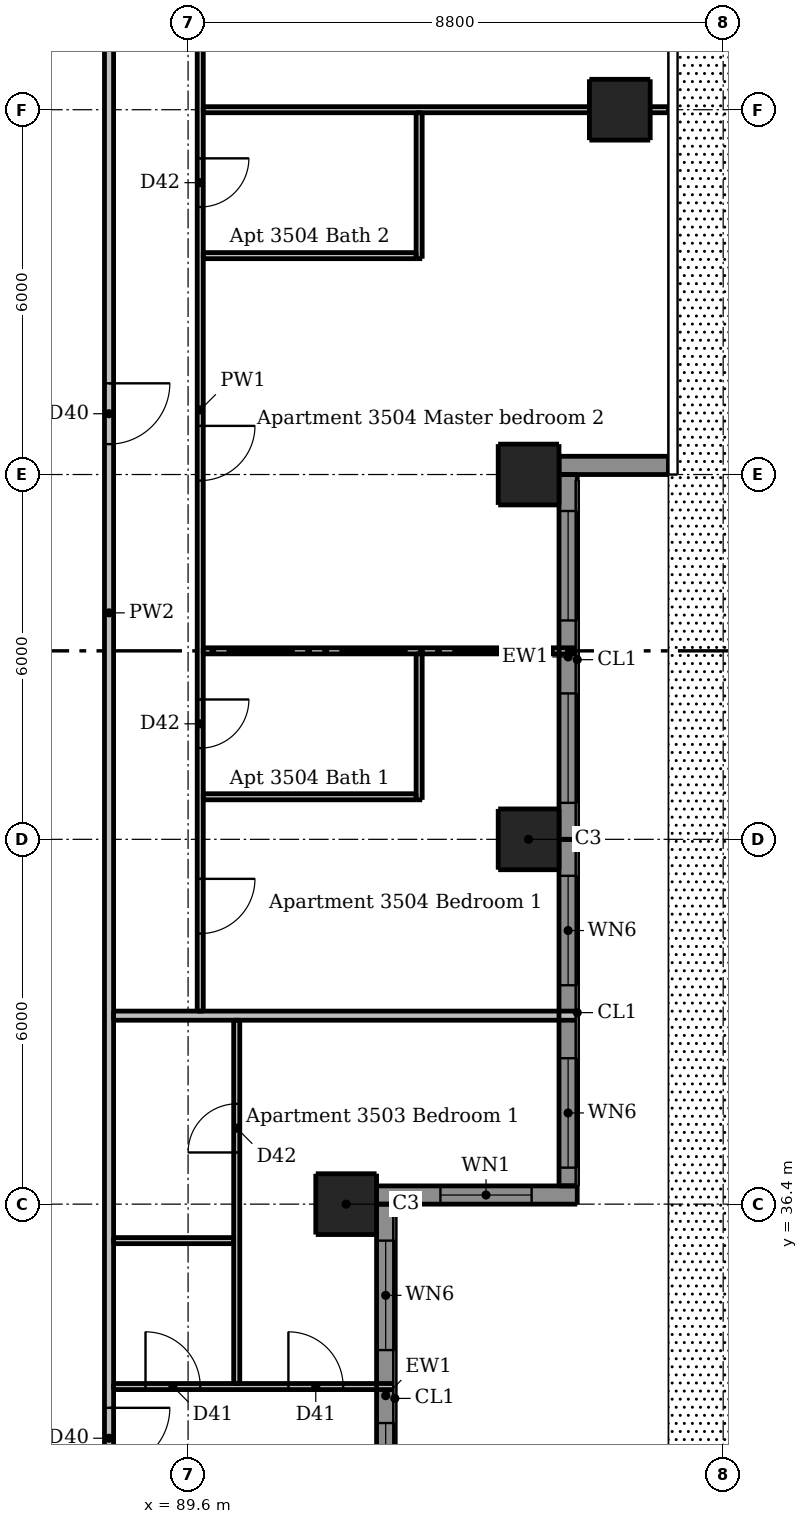
"""IFC4 building model, lengths in metres.
Left out: names, types, materials, properties, quantities, classifications, styles, units other than length and angle.
Written with IfcOpenShell. Run it as: python <this file> out.ifc"""

import sys

from ifc_helpers import new_model, si_unit, direction, frame, frame_2d, origin, origin_2d, place, context, subcontext, project, spatial, rectangle, extrude, element, fill, save


model = new_model("IFC4")
c1 = context("Model", 3, precision=1e-05, world=origin(), true_north=direction((0.0, 1.0)))
c2 = subcontext(c1, "Body", "Model", "MODEL_VIEW")
j1 = project(units=[si_unit("LENGTHUNIT", "METRE"), si_unit("PLANEANGLEUNIT", "RADIAN")], contexts=[c1])
p1 = place(None, origin())
s1 = spatial("IfcSite", under=j1, at=p1, CompositionType="ELEMENT")
p2 = place(p1, origin())
s2 = spatial("IfcBuilding", under=s1, at=p2, CompositionType="ELEMENT")
p3 = place(p2, frame((0.0, 0.0, 133.9)))
s3 = spatial("IfcBuildingStorey", under=s2, at=p3, CompositionType="ELEMENT", Elevation=133.9)
for number, where, z_axis, x_axis in (
    (1, (92.2, 36.4, 0.0), (0.0, 0.0, 1.0), (1.0, 0.0, 0.0)),
    (2, (95.2, 42.4, 0.0), (0.0, 0.0, 1.0), (1.0, 0.0, 0.0)),
    (3, (95.2, 48.4, 0.0), (0.0, 0.0, 1.0), (1.0, 0.0, 0.0)),
    (4, (96.7, 54.4, 0.0), (0.0, 0.0, 1.0), (1.0, 0.0, 0.0)),
):
    element("IfcColumn", number, at=place(p3, frame(where, z_axis=z_axis, x_axis=x_axis)), inside=s3, PredefinedType="COLUMN", context=c2, shape_type="SweptSolid", body=[
        extrude(rectangle(XDim=1.0, YDim=1.0, at=origin_2d()), origin(), (0.0, 0.0, 1.0), 3.05),
    ])
p4 = place(p3, frame((92.7, 36.55, 0.0), z_axis=(0.0, 0.0, 1.0), x_axis=(1.0, 0.0, 0.0)))
e5 = element("IfcWall", 5, at=p4, inside=s3, PredefinedType="SOLIDWALL", context=c2, shape_type="SweptSolid", body=[
    extrude(rectangle(XDim=3.3, YDim=0.3, at=frame_2d((1.65, 0.0))), origin(), (0.0, 0.0, 1.0), 3.05),
])
p5 = place(p4, frame((1.05, 0.0, 0.9)))
e6 = element("IfcOpeningElement", 6, at=p5, cuts=e5, PredefinedType="OPENING", context=c2, shape_type="SweptSolid", body=[
    extrude(rectangle(XDim=1.5, YDim=1.5, at=frame_2d((0.75, 0.75))), frame((0.0, 0.16, 0.0), z_axis=(0.0, -1.0, 0.0), x_axis=(1.0, 0.0, 0.0)), (0.0, 0.0, 1.0), 0.32),
])
p6 = place(p3, frame((95.7, 48.55, 0.0), z_axis=(0.0, 0.0, 1.0), x_axis=(1.0, 0.0, 0.0)))
e7 = element("IfcWall", 7, at=p6, inside=s3, PredefinedType="SOLIDWALL", context=c2, shape_type="SweptSolid", body=[
    extrude(rectangle(XDim=1.8, YDim=0.3, at=frame_2d((0.9, 0.0))), origin(), (0.0, 0.0, 1.0), 3.05),
])
p7 = place(p3, frame((92.85, 30.1, 0.0), z_axis=(0.0, 0.0, 1.0), x_axis=(0.0, 1.0, 0.0)))
e8 = element("IfcWall", 8, at=p7, inside=s3, PredefinedType="SOLIDWALL", context=c2, shape_type="SweptSolid", body=[
    extrude(rectangle(XDim=6.3, YDim=0.3, at=frame_2d((3.15, 0.0))), origin(), (0.0, 0.0, 1.0), 3.05),
])
p8 = place(p7, frame((0.9, 0.0, 0.15)))
e9 = element("IfcOpeningElement", 9, at=p8, cuts=e8, PredefinedType="OPENING", context=c2, shape_type="SweptSolid", body=[
    extrude(rectangle(XDim=1.8, YDim=2.1, at=frame_2d((0.9, 1.05))), frame((0.0, 0.16, 0.0), z_axis=(0.0, -1.0, 0.0), x_axis=(1.0, 0.0, 0.0)), (0.0, 0.0, 1.0), 0.32),
])
p9 = place(p7, frame((3.9, 0.0, 0.15)))
e10 = element("IfcOpeningElement", 10, at=p9, cuts=e8, PredefinedType="OPENING", context=c2, shape_type="SweptSolid", body=[
    extrude(rectangle(XDim=1.8, YDim=2.1, at=frame_2d((0.9, 1.05))), frame((0.0, 0.16, 0.0), z_axis=(0.0, -1.0, 0.0), x_axis=(1.0, 0.0, 0.0)), (0.0, 0.0, 1.0), 0.32),
])
p10 = place(p3, frame((95.85, 36.7, 0.0), z_axis=(0.0, 0.0, 1.0), x_axis=(0.0, 1.0, 0.0)))
e11 = element("IfcWall", 11, at=p10, inside=s3, PredefinedType="SOLIDWALL", context=c2, shape_type="SweptSolid", body=[
    extrude(rectangle(XDim=5.7, YDim=0.3, at=frame_2d((2.85, 0.0))), origin(), (0.0, 0.0, 1.0), 3.05),
])
p11 = place(p10, frame((0.3, 0.0, 0.15)))
e12 = element("IfcOpeningElement", 12, at=p11, cuts=e11, PredefinedType="OPENING", context=c2, shape_type="SweptSolid", body=[
    extrude(rectangle(XDim=1.8, YDim=2.1, at=frame_2d((0.9, 1.05))), frame((0.0, 0.16, 0.0), z_axis=(0.0, -1.0, 0.0), x_axis=(1.0, 0.0, 0.0)), (0.0, 0.0, 1.0), 0.32),
])
p12 = place(p10, frame((3.3, 0.0, 0.15)))
e13 = element("IfcOpeningElement", 13, at=p12, cuts=e11, PredefinedType="OPENING", context=c2, shape_type="SweptSolid", body=[
    extrude(rectangle(XDim=1.8, YDim=2.1, at=frame_2d((0.9, 1.05))), frame((0.0, 0.16, 0.0), z_axis=(0.0, -1.0, 0.0), x_axis=(1.0, 0.0, 0.0)), (0.0, 0.0, 1.0), 0.32),
])
p13 = place(p3, frame((95.85, 42.4, 0.0), z_axis=(0.0, 0.0, 1.0), x_axis=(0.0, 1.0, 0.0)))
e14 = element("IfcWall", 14, at=p13, inside=s3, PredefinedType="SOLIDWALL", context=c2, shape_type="SweptSolid", body=[
    extrude(rectangle(XDim=6.0, YDim=0.3, at=frame_2d((3.0, 0.0))), origin(), (0.0, 0.0, 1.0), 3.05),
])
p14 = place(p13, frame((0.6, 0.0, 0.15)))
e15 = element("IfcOpeningElement", 15, at=p14, cuts=e14, PredefinedType="OPENING", context=c2, shape_type="SweptSolid", body=[
    extrude(rectangle(XDim=1.8, YDim=2.1, at=frame_2d((0.9, 1.05))), frame((0.0, 0.16, 0.0), z_axis=(0.0, -1.0, 0.0), x_axis=(1.0, 0.0, 0.0)), (0.0, 0.0, 1.0), 0.32),
])
p15 = place(p13, frame((3.6, 0.0, 0.15)))
e16 = element("IfcOpeningElement", 16, at=p15, cuts=e14, PredefinedType="OPENING", context=c2, shape_type="SweptSolid", body=[
    extrude(rectangle(XDim=1.8, YDim=2.1, at=frame_2d((0.9, 1.05))), frame((0.0, 0.16, 0.0), z_axis=(0.0, -1.0, 0.0), x_axis=(1.0, 0.0, 0.0)), (0.0, 0.0, 1.0), 0.32),
])
p16 = place(p3, frame((89.8, 59.35, 0.0), z_axis=(0.0, 0.0, 1.0), x_axis=(0.0, -1.0, 0.0)))
e17 = element("IfcWall", 17, at=p16, inside=s3, PredefinedType="PARTITIONING", context=c2, shape_type="SweptSolid", body=[
    extrude(rectangle(XDim=19.775, YDim=0.1, at=frame_2d((9.888, 0.0))), origin(), (0.0, 0.0, 1.0), 3.05),
])
p17 = place(p16, frame((2.7, 0.0, 0.0)))
e18 = element("IfcOpeningElement", 18, at=p17, cuts=e17, PredefinedType="OPENING", context=c2, shape_type="SweptSolid", body=[
    extrude(rectangle(XDim=0.9, YDim=2.1, at=frame_2d((0.45, 1.05))), frame((0.0, 0.06, 0.0), z_axis=(0.0, -1.0, 0.0), x_axis=(1.0, 0.0, 0.0)), (0.0, 0.0, 1.0), 0.12),
])
p18 = place(p16, frame((17.6, 0.0, 0.0)))
e19 = element("IfcOpeningElement", 19, at=p18, cuts=e17, PredefinedType="OPENING", context=c2, shape_type="SweptSolid", body=[
    extrude(rectangle(XDim=0.9, YDim=2.1, at=frame_2d((0.45, 1.05))), frame((0.0, 0.06, 0.0), z_axis=(0.0, -1.0, 0.0), x_axis=(1.0, 0.0, 0.0)), (0.0, 0.0, 1.0), 0.12),
])
p19 = place(p16, frame((10.15, 0.0, 0.0)))
e20 = element("IfcOpeningElement", 20, at=p19, cuts=e17, PredefinedType="OPENING", context=c2, shape_type="SweptSolid", body=[
    extrude(rectangle(XDim=0.9, YDim=2.1, at=frame_2d((0.45, 1.05))), frame((0.0, 0.06, 0.0), z_axis=(0.0, -1.0, 0.0), x_axis=(1.0, 0.0, 0.0)), (0.0, 0.0, 1.0), 0.12),
])
p20 = place(p16, frame((14.65, 0.0, 0.0)))
e21 = element("IfcOpeningElement", 21, at=p20, cuts=e17, PredefinedType="OPENING", context=c2, shape_type="SweptSolid", body=[
    extrude(rectangle(XDim=0.8, YDim=2.1, at=frame_2d((0.4, 1.05))), frame((0.0, 0.06, 0.0), z_axis=(0.0, -1.0, 0.0), x_axis=(1.0, 0.0, 0.0)), (0.0, 0.0, 1.0), 0.12),
])
p21 = place(p16, frame((5.75, 0.0, 0.0)))
e22 = element("IfcOpeningElement", 22, at=p21, cuts=e17, PredefinedType="OPENING", context=c2, shape_type="SweptSolid", body=[
    extrude(rectangle(XDim=0.8, YDim=2.1, at=frame_2d((0.4, 1.05))), frame((0.0, 0.06, 0.0), z_axis=(0.0, -1.0, 0.0), x_axis=(1.0, 0.0, 0.0)), (0.0, 0.0, 1.0), 0.12),
])
p22 = place(p3, frame((90.4, 33.45, 0.0), z_axis=(0.0, 0.0, 1.0), x_axis=(0.0, 1.0, 0.0)))
e23 = element("IfcWall", 23, at=p22, inside=s3, PredefinedType="PARTITIONING", context=c2, shape_type="SweptSolid", body=[
    extrude(rectangle(XDim=5.975, YDim=0.1, at=frame_2d((2.988, 0.0))), origin(), (0.0, 0.0, 1.0), 3.05),
])
p23 = place(p22, frame((3.8, 0.0, 0.0)))
e24 = element("IfcOpeningElement", 24, at=p23, cuts=e23, PredefinedType="OPENING", context=c2, shape_type="SweptSolid", body=[
    extrude(rectangle(XDim=0.8, YDim=2.1, at=frame_2d((0.4, 1.05))), frame((0.0, 0.06, 0.0), z_axis=(0.0, -1.0, 0.0), x_axis=(1.0, 0.0, 0.0)), (0.0, 0.0, 1.0), 0.12),
])
p24 = place(p3, frame((93.4, 43.05, 0.0), z_axis=(0.0, 0.0, 1.0), x_axis=(0.0, 1.0, 0.0)))
e25 = element("IfcWall", 25, at=p24, inside=s3, PredefinedType="PARTITIONING", context=c2, shape_type="SweptSolid", body=[
    extrude(rectangle(XDim=2.4, YDim=0.1, at=frame_2d((1.2, 0.0))), origin(), (0.0, 0.0, 1.0), 3.05),
])
p25 = place(p3, frame((93.4, 51.95, 0.0), z_axis=(0.0, 0.0, 1.0), x_axis=(0.0, 1.0, 0.0)))
e26 = element("IfcWall", 26, at=p25, inside=s3, PredefinedType="PARTITIONING", context=c2, shape_type="SweptSolid", body=[
    extrude(rectangle(XDim=2.4, YDim=0.1, at=frame_2d((1.2, 0.0))), origin(), (0.0, 0.0, 1.0), 3.05),
])
p26 = place(p3, frame((89.85, 54.4, 0.0), z_axis=(0.0, 0.0, 1.0), x_axis=(1.0, 0.0, 0.0)))
e27 = element("IfcWall", 27, at=p26, inside=s3, PredefinedType="PARTITIONING", context=c2, shape_type="SweptSolid", body=[
    extrude(rectangle(XDim=7.65, YDim=0.1, at=frame_2d((3.825, 0.0))), origin(), (0.0, 0.0, 1.0), 2.516),
])
p27 = place(p3, frame((89.85, 52.0, 0.0), z_axis=(0.0, 0.0, 1.0), x_axis=(1.0, 0.0, 0.0)))
e28 = element("IfcWall", 28, at=p27, inside=s3, PredefinedType="PARTITIONING", context=c2, shape_type="SweptSolid", body=[
    extrude(rectangle(XDim=3.5, YDim=0.1, at=frame_2d((1.75, 0.0))), origin(), (0.0, 0.0, 1.0), 3.05),
])
p28 = place(p3, frame((89.85, 45.5, 0.0), z_axis=(0.0, 0.0, 1.0), x_axis=(1.0, 0.0, 0.0)))
e29 = element("IfcWall", 29, at=p28, inside=s3, PredefinedType="PARTITIONING", context=c2, shape_type="SweptSolid", body=[
    extrude(rectangle(XDim=6.15, YDim=0.1, at=frame_2d((3.075, 0.0))), origin(), (0.0, 0.0, 1.0), 3.05),
])
p29 = place(p3, frame((89.85, 43.1, 0.0), z_axis=(0.0, 0.0, 1.0), x_axis=(1.0, 0.0, 0.0)))
e30 = element("IfcWall", 30, at=p29, inside=s3, PredefinedType="PARTITIONING", context=c2, shape_type="SweptSolid", body=[
    extrude(rectangle(XDim=3.5, YDim=0.1, at=frame_2d((1.75, 0.0))), origin(), (0.0, 0.0, 1.0), 3.05),
])
p30 = place(p3, frame((88.375, 35.8, 0.0), z_axis=(0.0, 0.0, 1.0), x_axis=(1.0, 0.0, 0.0)))
e31 = element("IfcWall", 31, at=p30, inside=s3, PredefinedType="PARTITIONING", context=c2, shape_type="SweptSolid", body=[
    extrude(rectangle(XDim=1.975, YDim=0.1, at=frame_2d((0.988, 0.0))), origin(), (0.0, 0.0, 1.0), 3.05),
])
p31 = place(p3, frame((88.375, 33.4, 0.0), z_axis=(0.0, 0.0, 1.0), x_axis=(1.0, 0.0, 0.0)))
e32 = element("IfcWall", 32, at=p31, inside=s3, PredefinedType="PARTITIONING", context=c2, shape_type="SweptSolid", body=[
    extrude(rectangle(XDim=4.625, YDim=0.1, at=frame_2d((2.312, 0.0))), origin(), (0.0, 0.0, 1.0), 3.05),
])
p32 = place(p31, frame((0.525, 0.0, 0.0)))
e33 = element("IfcOpeningElement", 33, at=p32, cuts=e32, PredefinedType="OPENING", context=c2, shape_type="SweptSolid", body=[
    extrude(rectangle(XDim=0.9, YDim=2.1, at=frame_2d((0.45, 1.05))), frame((0.0, 0.06, 0.0), z_axis=(0.0, -1.0, 0.0), x_axis=(1.0, 0.0, 0.0)), (0.0, 0.0, 1.0), 0.12),
])
p33 = place(p31, frame((2.875, 0.0, 0.0)))
e34 = element("IfcOpeningElement", 34, at=p33, cuts=e32, PredefinedType="OPENING", context=c2, shape_type="SweptSolid", body=[
    extrude(rectangle(XDim=0.9, YDim=2.1, at=frame_2d((0.45, 1.05))), frame((0.0, 0.06, 0.0), z_axis=(0.0, -1.0, 0.0), x_axis=(1.0, 0.0, 0.0)), (0.0, 0.0, 1.0), 0.12),
])
p34 = place(p3, frame((88.3, 60.475, 0.0), z_axis=(0.0, 0.0, 1.0), x_axis=(0.0, -1.0, 0.0)))
e35 = element("IfcWall", 35, at=p34, inside=s3, PredefinedType="PARTITIONING", context=c2, shape_type="SweptSolid", body=[
    extrude(rectangle(XDim=28.7, YDim=0.15, at=frame_2d((14.35, 0.0))), origin(), (0.0, 0.0, 1.0), 3.05),
])
p35 = place(p34, frame((27.425, 0.0, 0.0)))
e36 = element("IfcOpeningElement", 36, at=p35, cuts=e35, PredefinedType="OPENING", context=c2, shape_type="SweptSolid", body=[
    extrude(rectangle(XDim=1.0, YDim=2.1, at=frame_2d((0.5, 1.05))), frame((0.0, 0.085, 0.0), z_axis=(0.0, -1.0, 0.0), x_axis=(1.0, 0.0, 0.0)), (0.0, 0.0, 1.0), 0.17),
])
p36 = place(p34, frame((10.575, 0.0, 0.0)))
e37 = element("IfcOpeningElement", 37, at=p36, cuts=e35, PredefinedType="OPENING", context=c2, shape_type="SweptSolid", body=[
    extrude(rectangle(XDim=1.0, YDim=2.1, at=frame_2d((0.5, 1.05))), frame((0.0, 0.085, 0.0), z_axis=(0.0, -1.0, 0.0), x_axis=(1.0, 0.0, 0.0)), (0.0, 0.0, 1.0), 0.17),
])
p37 = place(p3, frame((88.375, 39.5, 0.0), z_axis=(0.0, 0.0, 1.0), x_axis=(1.0, 0.0, 0.0)))
e38 = element("IfcWall", 38, at=p37, inside=s3, PredefinedType="PARTITIONING", context=c2, shape_type="SweptSolid", body=[
    extrude(rectangle(XDim=7.625, YDim=0.15, at=frame_2d((3.812, 0.0))), origin(), (0.0, 0.0, 1.0), 3.05),
])
p38 = place(p5, origin())
e39 = element("IfcWindow", 39, at=p38, inside=s3, PartitioningType="DOUBLE_PANEL_VERTICAL", PredefinedType="WINDOW", context=c2, shape_type="SweptSolid", body=[
    extrude(rectangle(XDim=1.5, YDim=1.5, at=frame_2d((0.75, 0.75))), frame((0.0, 0.03, 0.0), z_axis=(0.0, -1.0, 0.0), x_axis=(1.0, 0.0, 0.0)), (0.0, 0.0, 1.0), 0.06),
])
fill(e6, e39)
p39 = place(p8, origin())
e40 = element("IfcWindow", 40, at=p39, inside=s3, PartitioningType="DOUBLE_PANEL_VERTICAL", PredefinedType="WINDOW", context=c2, shape_type="SweptSolid", body=[
    extrude(rectangle(XDim=1.8, YDim=2.1, at=frame_2d((0.9, 1.05))), frame((0.0, 0.03, 0.0), z_axis=(0.0, -1.0, 0.0), x_axis=(1.0, 0.0, 0.0)), (0.0, 0.0, 1.0), 0.06),
])
fill(e9, e40)
p40 = place(p9, origin())
e41 = element("IfcWindow", 41, at=p40, inside=s3, PartitioningType="DOUBLE_PANEL_VERTICAL", PredefinedType="WINDOW", context=c2, shape_type="SweptSolid", body=[
    extrude(rectangle(XDim=1.8, YDim=2.1, at=frame_2d((0.9, 1.05))), frame((0.0, 0.03, 0.0), z_axis=(0.0, -1.0, 0.0), x_axis=(1.0, 0.0, 0.0)), (0.0, 0.0, 1.0), 0.06),
])
fill(e10, e41)
p41 = place(p11, origin())
e42 = element("IfcWindow", 42, at=p41, inside=s3, PartitioningType="DOUBLE_PANEL_VERTICAL", PredefinedType="WINDOW", context=c2, shape_type="SweptSolid", body=[
    extrude(rectangle(XDim=1.8, YDim=2.1, at=frame_2d((0.9, 1.05))), frame((0.0, 0.03, 0.0), z_axis=(0.0, -1.0, 0.0), x_axis=(1.0, 0.0, 0.0)), (0.0, 0.0, 1.0), 0.06),
])
fill(e12, e42)
p42 = place(p12, origin())
e43 = element("IfcWindow", 43, at=p42, inside=s3, PartitioningType="DOUBLE_PANEL_VERTICAL", PredefinedType="WINDOW", context=c2, shape_type="SweptSolid", body=[
    extrude(rectangle(XDim=1.8, YDim=2.1, at=frame_2d((0.9, 1.05))), frame((0.0, 0.03, 0.0), z_axis=(0.0, -1.0, 0.0), x_axis=(1.0, 0.0, 0.0)), (0.0, 0.0, 1.0), 0.06),
])
fill(e13, e43)
p43 = place(p14, origin())
e44 = element("IfcWindow", 44, at=p43, inside=s3, PartitioningType="DOUBLE_PANEL_VERTICAL", PredefinedType="WINDOW", context=c2, shape_type="SweptSolid", body=[
    extrude(rectangle(XDim=1.8, YDim=2.1, at=frame_2d((0.9, 1.05))), frame((0.0, 0.03, 0.0), z_axis=(0.0, -1.0, 0.0), x_axis=(1.0, 0.0, 0.0)), (0.0, 0.0, 1.0), 0.06),
])
fill(e15, e44)
p44 = place(p15, origin())
e45 = element("IfcWindow", 45, at=p44, inside=s3, PartitioningType="DOUBLE_PANEL_VERTICAL", PredefinedType="WINDOW", context=c2, shape_type="SweptSolid", body=[
    extrude(rectangle(XDim=1.8, YDim=2.1, at=frame_2d((0.9, 1.05))), frame((0.0, 0.03, 0.0), z_axis=(0.0, -1.0, 0.0), x_axis=(1.0, 0.0, 0.0)), (0.0, 0.0, 1.0), 0.06),
])
fill(e16, e45)
p45 = place(p35, origin())
e46 = element("IfcDoor", 46, at=p45, inside=s3, OperationType="SINGLE_SWING_LEFT", PredefinedType="DOOR", context=c2, shape_type="SweptSolid", body=[
    extrude(rectangle(XDim=1.0, YDim=2.1, at=frame_2d((0.5, 1.05))), frame((0.0, 0.025, 0.0), z_axis=(0.0, -1.0, 0.0), x_axis=(1.0, 0.0, 0.0)), (0.0, 0.0, 1.0), 0.05),
])
fill(e36, e46)
p46 = place(p32, origin())
e47 = element("IfcDoor", 47, at=p46, inside=s3, OperationType="SINGLE_SWING_LEFT", PredefinedType="DOOR", context=c2, shape_type="SweptSolid", body=[
    extrude(rectangle(XDim=0.9, YDim=2.1, at=frame_2d((0.45, 1.05))), frame((0.0, 0.025, 0.0), z_axis=(0.0, -1.0, 0.0), x_axis=(1.0, 0.0, 0.0)), (0.0, 0.0, 1.0), 0.05),
])
fill(e33, e47)
p47 = place(p33, origin())
e48 = element("IfcDoor", 48, at=p47, inside=s3, OperationType="SINGLE_SWING_LEFT", PredefinedType="DOOR", context=c2, shape_type="SweptSolid", body=[
    extrude(rectangle(XDim=0.9, YDim=2.1, at=frame_2d((0.45, 1.05))), frame((0.0, 0.025, 0.0), z_axis=(0.0, -1.0, 0.0), x_axis=(1.0, 0.0, 0.0)), (0.0, 0.0, 1.0), 0.05),
])
fill(e34, e48)
p48 = place(p23, origin())
e49 = element("IfcDoor", 49, at=p48, inside=s3, OperationType="SINGLE_SWING_LEFT", PredefinedType="DOOR", context=c2, shape_type="SweptSolid", body=[
    extrude(rectangle(XDim=0.8, YDim=2.1, at=frame_2d((0.4, 1.05))), frame((0.0, 0.025, 0.0), z_axis=(0.0, -1.0, 0.0), x_axis=(1.0, 0.0, 0.0)), (0.0, 0.0, 1.0), 0.05),
])
fill(e24, e49)
p49 = place(p36, origin())
e50 = element("IfcDoor", 50, at=p49, inside=s3, OperationType="SINGLE_SWING_LEFT", PredefinedType="DOOR", context=c2, shape_type="SweptSolid", body=[
    extrude(rectangle(XDim=1.0, YDim=2.1, at=frame_2d((0.5, 1.05))), frame((0.0, 0.025, 0.0), z_axis=(0.0, -1.0, 0.0), x_axis=(1.0, 0.0, 0.0)), (0.0, 0.0, 1.0), 0.05),
])
fill(e37, e50)
p50 = place(p18, origin())
e51 = element("IfcDoor", 51, at=p50, inside=s3, OperationType="SINGLE_SWING_LEFT", PredefinedType="DOOR", context=c2, shape_type="SweptSolid", body=[
    extrude(rectangle(XDim=0.9, YDim=2.1, at=frame_2d((0.45, 1.05))), frame((0.0, 0.025, 0.0), z_axis=(0.0, -1.0, 0.0), x_axis=(1.0, 0.0, 0.0)), (0.0, 0.0, 1.0), 0.05),
])
fill(e19, e51)
p51 = place(p19, origin())
e52 = element("IfcDoor", 52, at=p51, inside=s3, OperationType="SINGLE_SWING_LEFT", PredefinedType="DOOR", context=c2, shape_type="SweptSolid", body=[
    extrude(rectangle(XDim=0.9, YDim=2.1, at=frame_2d((0.45, 1.05))), frame((0.0, 0.025, 0.0), z_axis=(0.0, -1.0, 0.0), x_axis=(1.0, 0.0, 0.0)), (0.0, 0.0, 1.0), 0.05),
])
fill(e20, e52)
p52 = place(p20, origin())
e53 = element("IfcDoor", 53, at=p52, inside=s3, OperationType="SINGLE_SWING_LEFT", PredefinedType="DOOR", context=c2, shape_type="SweptSolid", body=[
    extrude(rectangle(XDim=0.8, YDim=2.1, at=frame_2d((0.4, 1.05))), frame((0.0, 0.025, 0.0), z_axis=(0.0, -1.0, 0.0), x_axis=(1.0, 0.0, 0.0)), (0.0, 0.0, 1.0), 0.05),
])
fill(e21, e53)
p53 = place(p21, origin())
e54 = element("IfcDoor", 54, at=p53, inside=s3, OperationType="SINGLE_SWING_LEFT", PredefinedType="DOOR", context=c2, shape_type="SweptSolid", body=[
    extrude(rectangle(XDim=0.8, YDim=2.1, at=frame_2d((0.4, 1.05))), frame((0.0, 0.025, 0.0), z_axis=(0.0, -1.0, 0.0), x_axis=(1.0, 0.0, 0.0)), (0.0, 0.0, 1.0), 0.05),
])
fill(e22, e54)
save(model, sys.argv[1])
